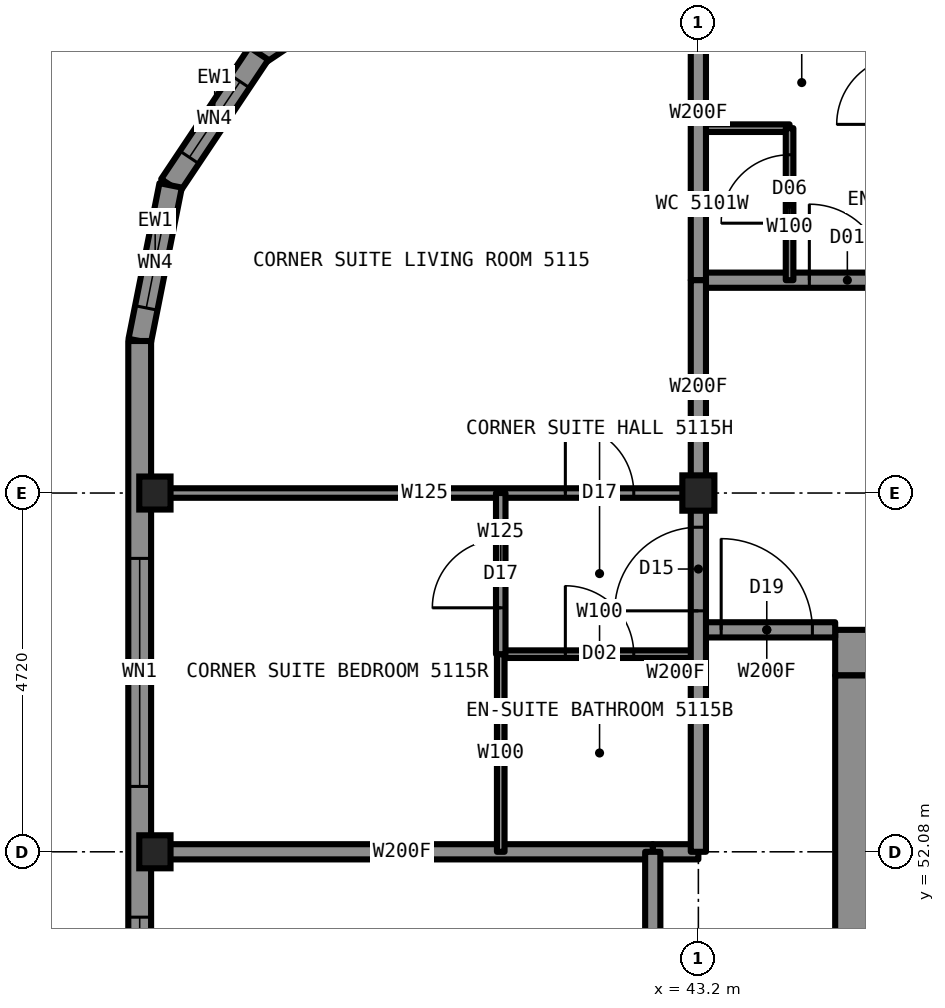
"""IFC4 building model, lengths in metres.
Left out: names, types, materials, properties, quantities, classifications, styles, units other than length and angle.
Written with IfcOpenShell. Run it as: python <this file> out.ifc"""

import sys

from ifc_helpers import new_model, si_unit, direction, frame, frame_2d, origin, origin_2d, place, context, subcontext, project, spatial, rectangle, i_section, extrude, element, fill, save


model = new_model("IFC4")
c1 = context("Model", 3, precision=1e-05, world=origin(), true_north=direction((0.0, 1.0)))
c2 = subcontext(c1, "Body", "Model", "MODEL_VIEW")
j1 = project(units=[si_unit("LENGTHUNIT", "METRE"), si_unit("PLANEANGLEUNIT", "RADIAN")], contexts=[c1])
p1 = place(None, origin())
s1 = spatial("IfcSite", under=j1, at=p1, CompositionType="ELEMENT")
p2 = place(p1, origin())
s2 = spatial("IfcBuilding", under=s1, at=p2, CompositionType="ELEMENT")
p3 = place(p2, frame((0.0, 0.0, 182.8)))
s3 = spatial("IfcBuildingStorey", under=s2, at=p3, CompositionType="ELEMENT", Elevation=182.8)
for number, where, z_axis, x_axis in (
    (1, (36.05, 52.08, 0.0), (0.0, 0.0, 1.0), (1.0, 0.0, 0.0)),
    (2, (36.05, 56.8, 0.0), (0.0, 0.0, 1.0), (1.0, 0.0, 0.0)),
):
    element("IfcColumn", number, at=place(p3, frame(where, z_axis=z_axis, x_axis=x_axis)), inside=s3, PredefinedType="COLUMN", context=c2, shape_type="SweptSolid", body=[
        extrude(i_section(OverallWidth=0.411, OverallDepth=0.434, WebThickness=0.036, FlangeThickness=0.057, at=origin_2d()), origin(), (0.0, 0.0, 1.0), 3.5),
    ])
p4 = place(p3, frame((43.2, 56.8, 0.0), z_axis=(0.0, 0.0, 1.0), x_axis=(1.0, 0.0, 0.0)))
e3 = element("IfcColumn", 3, at=p4, inside=s3, PredefinedType="COLUMN", context=c2, shape_type="SweptSolid", body=[
    extrude(i_section(OverallWidth=0.422, OverallDepth=0.465, WebThickness=0.045, FlangeThickness=0.073, at=origin_2d()), origin(), (0.0, 0.0, 1.0), 3.5),
])
p5 = place(p3, frame((45.0, 54.7, 0.0), z_axis=(0.0, 0.0, 1.0), x_axis=(1.0, 0.0, 0.0)))
e4 = element("IfcWall", 4, at=p5, inside=s3, PredefinedType="SHEAR", context=c2, shape_type="SweptSolid", body=[
    extrude(rectangle(XDim=20.0, YDim=0.6, at=frame_2d((10.0, 0.0))), origin(), (0.0, 0.0, 1.0), 3.5),
])
p6 = place(p3, frame((45.3, 35.6, 0.0), z_axis=(0.0, 0.0, 1.0), x_axis=(0.0, 1.0, 0.0)))
e5 = element("IfcWall", 5, at=p6, inside=s3, PredefinedType="SHEAR", context=c2, shape_type="SweptSolid", body=[
    extrude(rectangle(XDim=18.8, YDim=0.6, at=frame_2d((9.4, 0.0))), origin(), (0.0, 0.0, 1.0), 3.5),
])
p7 = place(p6, frame((13.4, 0.0, 0.0)))
e6 = element("IfcOpeningElement", 6, at=p7, cuts=e5, PredefinedType="OPENING", context=c2, shape_type="SweptSolid", body=[
    extrude(rectangle(XDim=1.8, YDim=2.2, at=frame_2d((0.9, 1.1))), frame((0.0, 0.31, 0.0), z_axis=(0.0, -1.0, 0.0), x_axis=(1.0, 0.0, 0.0)), (0.0, 0.0, 1.0), 0.62),
])
p8 = place(p6, frame((3.6, 0.0, 0.0)))
e7 = element("IfcOpeningElement", 7, at=p8, cuts=e5, PredefinedType="OPENING", context=c2, shape_type="SweptSolid", body=[
    extrude(rectangle(XDim=1.8, YDim=2.2, at=frame_2d((0.9, 1.1))), frame((0.0, 0.31, 0.0), z_axis=(0.0, -1.0, 0.0), x_axis=(1.0, 0.0, 0.0)), (0.0, 0.0, 1.0), 0.62),
])
p9 = place(p6, frame((6.4, 0.0, 0.0)))
e8 = element("IfcOpeningElement", 8, at=p9, cuts=e5, PredefinedType="OPENING", context=c2, shape_type="SweptSolid", body=[
    extrude(rectangle(XDim=1.2, YDim=2.2, at=frame_2d((0.6, 1.1))), frame((0.0, 0.31, 0.0), z_axis=(0.0, -1.0, 0.0), x_axis=(1.0, 0.0, 0.0)), (0.0, 0.0, 1.0), 0.62),
])
p10 = place(p3, frame((43.2, 55.0, 0.0), z_axis=(0.0, 0.0, 1.0), x_axis=(1.0, 0.0, 0.0)))
e9 = element("IfcWall", 9, at=p10, inside=s3, PredefinedType="PARTITIONING", context=c2, shape_type="SweptSolid", body=[
    extrude(rectangle(XDim=1.8, YDim=0.2, at=frame_2d((0.9, 0.0))), origin(), (0.0, 0.0, 1.0), 3.33),
])
p11 = place(p10, frame((0.3, 0.0, 0.0)))
e10 = element("IfcOpeningElement", 10, at=p11, cuts=e9, PredefinedType="OPENING", context=c2, shape_type="SweptSolid", body=[
    extrude(rectangle(XDim=1.2, YDim=2.2, at=frame_2d((0.6, 1.1))), frame((0.0, 0.11, 0.0), z_axis=(0.0, -1.0, 0.0), x_axis=(1.0, 0.0, 0.0)), (0.0, 0.0, 1.0), 0.22),
])
p12 = place(p3, frame((36.0, 56.8, 0.0), z_axis=(0.0, 0.0, 1.0), x_axis=(1.0, 0.0, 0.0)))
e11 = element("IfcWall", 11, at=p12, inside=s3, PredefinedType="PARTITIONING", context=c2, shape_type="SweptSolid", body=[
    extrude(rectangle(XDim=7.2, YDim=0.125, at=frame_2d((3.6, 0.0))), origin(), (0.0, 0.0, 1.0), 2.573),
])
p13 = place(p12, frame((5.45, 0.0, 0.0)))
e12 = element("IfcOpeningElement", 12, at=p13, cuts=e11, PredefinedType="OPENING", context=c2, shape_type="SweptSolid", body=[
    extrude(rectangle(XDim=0.9, YDim=2.2, at=frame_2d((0.45, 1.1))), frame((0.0, 0.073, 0.0), z_axis=(0.0, -1.0, 0.0), x_axis=(1.0, 0.0, 0.0)), (0.0, 0.0, 1.0), 0.145),
])
p14 = place(p3, frame((43.2, 59.6, 0.0), z_axis=(0.0, 0.0, 1.0), x_axis=(1.0, 0.0, 0.0)))
e13 = element("IfcWall", 13, at=p14, inside=s3, PredefinedType="PARTITIONING", context=c2, shape_type="SweptSolid", body=[
    extrude(rectangle(XDim=23.6, YDim=0.2, at=frame_2d((11.8, 0.0))), origin(), (0.0, 0.0, 1.0), 3.33),
])
p15 = place(p14, frame((1.46, 0.0, 0.0)))
e14 = element("IfcOpeningElement", 14, at=p15, cuts=e13, PredefinedType="OPENING", context=c2, shape_type="SweptSolid", body=[
    extrude(rectangle(XDim=1.0, YDim=2.2, at=frame_2d((0.5, 1.1))), frame((0.0, 0.11, 0.0), z_axis=(0.0, -1.0, 0.0), x_axis=(1.0, 0.0, 0.0)), (0.0, 0.0, 1.0), 0.22),
])
p16 = place(p14, frame((7.27, 0.0, 0.0)))
e15 = element("IfcOpeningElement", 15, at=p16, cuts=e13, PredefinedType="OPENING", context=c2, shape_type="SweptSolid", body=[
    extrude(rectangle(XDim=1.0, YDim=2.2, at=frame_2d((0.5, 1.1))), frame((0.0, 0.11, 0.0), z_axis=(0.0, -1.0, 0.0), x_axis=(1.0, 0.0, 0.0)), (0.0, 0.0, 1.0), 0.22),
])
p17 = place(p14, frame((9.84, 0.0, 0.0)))
e16 = element("IfcOpeningElement", 16, at=p17, cuts=e13, PredefinedType="OPENING", context=c2, shape_type="SweptSolid", body=[
    extrude(rectangle(XDim=1.0, YDim=2.2, at=frame_2d((0.5, 1.1))), frame((0.0, 0.11, 0.0), z_axis=(0.0, -1.0, 0.0), x_axis=(1.0, 0.0, 0.0)), (0.0, 0.0, 1.0), 0.22),
])
p18 = place(p14, frame((16.71, 0.0, 0.0)))
e17 = element("IfcOpeningElement", 17, at=p18, cuts=e13, PredefinedType="OPENING", context=c2, shape_type="SweptSolid", body=[
    extrude(rectangle(XDim=1.0, YDim=2.2, at=frame_2d((0.5, 1.1))), frame((0.0, 0.11, 0.0), z_axis=(0.0, -1.0, 0.0), x_axis=(1.0, 0.0, 0.0)), (0.0, 0.0, 1.0), 0.22),
])
p19 = place(p14, frame((20.34, 0.0, 0.0)))
e18 = element("IfcOpeningElement", 18, at=p19, cuts=e13, PredefinedType="OPENING", context=c2, shape_type="SweptSolid", body=[
    extrude(rectangle(XDim=1.0, YDim=2.2, at=frame_2d((0.5, 1.1))), frame((0.0, 0.11, 0.0), z_axis=(0.0, -1.0, 0.0), x_axis=(1.0, 0.0, 0.0)), (0.0, 0.0, 1.0), 0.22),
])
p20 = place(p3, frame((43.2, 61.6, 0.0), z_axis=(0.0, 0.0, 1.0), x_axis=(1.0, 0.0, 0.0)))
e19 = element("IfcWall", 19, at=p20, inside=s3, PredefinedType="PARTITIONING", context=c2, shape_type="SweptSolid", body=[
    extrude(rectangle(XDim=1.2, YDim=0.1, at=frame_2d((0.6, 0.0))), origin(), (0.0, 0.0, 1.0), 3.33),
])
p21 = place(p3, frame((42.6, 52.08, 0.0), z_axis=(0.0, 0.0, 1.0), x_axis=(1.0, 0.0, 0.0)))
e20 = element("IfcWall", 20, at=p21, inside=s3, PredefinedType="PARTITIONING", context=c2, shape_type="SweptSolid", body=[
    extrude(rectangle(XDim=0.6, YDim=0.2, at=frame_2d((0.3, 0.0))), origin(), (0.0, 0.0, 1.0), 2.573),
])
p22 = place(p3, frame((36.0, 52.08, 0.0), z_axis=(0.0, 0.0, 1.0), x_axis=(1.0, 0.0, 0.0)))
e21 = element("IfcWall", 21, at=p22, inside=s3, PredefinedType="PARTITIONING", context=c2, shape_type="SweptSolid", body=[
    extrude(rectangle(XDim=6.6, YDim=0.2, at=frame_2d((3.3, 0.0))), origin(), (0.0, 0.0, 1.0), 2.573),
])
p23 = place(p3, frame((40.6, 54.68, 0.0), z_axis=(0.0, 0.0, 1.0), x_axis=(1.0, 0.0, 0.0)))
e22 = element("IfcWall", 22, at=p23, inside=s3, PredefinedType="PARTITIONING", context=c2, shape_type="SweptSolid", body=[
    extrude(rectangle(XDim=2.6, YDim=0.1, at=frame_2d((1.3, 0.0))), origin(), (0.0, 0.0, 1.0), 3.33),
])
p24 = place(p23, frame((0.85, 0.0, 0.0)))
e23 = element("IfcOpeningElement", 23, at=p24, cuts=e22, PredefinedType="OPENING", context=c2, shape_type="SweptSolid", body=[
    extrude(rectangle(XDim=0.9, YDim=2.1, at=frame_2d((0.45, 1.05))), frame((0.0, 0.06, 0.0), z_axis=(0.0, -1.0, 0.0), x_axis=(1.0, 0.0, 0.0)), (0.0, 0.0, 1.0), 0.12),
])
p25 = place(p3, frame((44.4, 59.6, 0.0), z_axis=(0.0, 0.0, 1.0), x_axis=(0.0, 1.0, 0.0)))
e24 = element("IfcWall", 24, at=p25, inside=s3, PredefinedType="PARTITIONING", context=c2, shape_type="SweptSolid", body=[
    extrude(rectangle(XDim=2.0, YDim=0.1, at=frame_2d((1.0, 0.0))), origin(), (0.0, 0.0, 1.0), 3.33),
])
p26 = place(p25, frame((0.75, 0.0, 0.0)))
e25 = element("IfcOpeningElement", 25, at=p26, cuts=e24, PredefinedType="OPENING", context=c2, shape_type="SweptSolid", body=[
    extrude(rectangle(XDim=0.9, YDim=2.1, at=frame_2d((0.45, 1.05))), frame((0.0, 0.06, 0.0), z_axis=(0.0, -1.0, 0.0), x_axis=(1.0, 0.0, 0.0)), (0.0, 0.0, 1.0), 0.12),
])
p27 = place(p3, frame((43.2, 52.08, 0.0), z_axis=(0.0, 0.0, 1.0), x_axis=(0.0, 1.0, 0.0)))
e26 = element("IfcWall", 26, at=p27, inside=s3, PredefinedType="PARTITIONING", context=c2, shape_type="SweptSolid", body=[
    extrude(rectangle(XDim=4.7, YDim=0.2, at=frame_2d((2.35, 0.0))), origin(), (0.0, 0.0, 1.0), 3.33),
])
p28 = place(p27, frame((3.17, 0.0, 0.0)))
e27 = element("IfcOpeningElement", 27, at=p28, cuts=e26, PredefinedType="OPENING", context=c2, shape_type="SweptSolid", body=[
    extrude(rectangle(XDim=1.1, YDim=2.2, at=frame_2d((0.55, 1.1))), frame((0.0, 0.11, 0.0), z_axis=(0.0, -1.0, 0.0), x_axis=(1.0, 0.0, 0.0)), (0.0, 0.0, 1.0), 0.22),
])
p29 = place(p3, frame((43.2, 59.6, 0.0), z_axis=(0.0, 0.0, 1.0), x_axis=(0.0, 1.0, 0.0)))
e28 = element("IfcWall", 28, at=p29, inside=s3, PredefinedType="PARTITIONING", context=c2, shape_type="SweptSolid", body=[
    extrude(rectangle(XDim=4.4, YDim=0.2, at=frame_2d((2.2, 0.0))), origin(), (0.0, 0.0, 1.0), 2.573),
])
p30 = place(p3, frame((42.6, 37.92, 0.0), z_axis=(0.0, 0.0, 1.0), x_axis=(0.0, 1.0, 0.0)))
e29 = element("IfcWall", 29, at=p30, inside=s3, PredefinedType="PARTITIONING", context=c2, shape_type="SweptSolid", body=[
    extrude(rectangle(XDim=14.16, YDim=0.2, at=frame_2d((7.08, 0.0))), origin(), (0.0, 0.0, 1.0), 3.33),
])
p31 = place(p30, frame((3.0, 0.0, 0.0)))
e30 = element("IfcOpeningElement", 30, at=p31, cuts=e29, PredefinedType="OPENING", context=c2, shape_type="SweptSolid", body=[
    extrude(rectangle(XDim=1.0, YDim=2.2, at=frame_2d((0.5, 1.1))), frame((0.0, 0.11, 0.0), z_axis=(0.0, -1.0, 0.0), x_axis=(1.0, 0.0, 0.0)), (0.0, 0.0, 1.0), 0.22),
])
p32 = place(p30, frame((11.99, 0.0, 0.0)))
e31 = element("IfcOpeningElement", 31, at=p32, cuts=e29, PredefinedType="OPENING", context=c2, shape_type="SweptSolid", body=[
    extrude(rectangle(XDim=1.0, YDim=2.2, at=frame_2d((0.5, 1.1))), frame((0.0, 0.11, 0.0), z_axis=(0.0, -1.0, 0.0), x_axis=(1.0, 0.0, 0.0)), (0.0, 0.0, 1.0), 0.22),
])
p33 = place(p3, frame((40.6, 52.08, 0.0), z_axis=(0.0, 0.0, 1.0), x_axis=(0.0, 1.0, 0.0)))
e32 = element("IfcWall", 32, at=p33, inside=s3, PredefinedType="PARTITIONING", context=c2, shape_type="SweptSolid", body=[
    extrude(rectangle(XDim=2.6, YDim=0.1, at=frame_2d((1.3, 0.0))), origin(), (0.0, 0.0, 1.0), 3.33),
])
p34 = place(p3, frame((40.6, 54.68, 0.0), z_axis=(0.0, 0.0, 1.0), x_axis=(0.0, 1.0, 0.0)))
e33 = element("IfcWall", 33, at=p34, inside=s3, PredefinedType="PARTITIONING", context=c2, shape_type="SweptSolid", body=[
    extrude(rectangle(XDim=2.12, YDim=0.125, at=frame_2d((1.06, 0.0))), origin(), (0.0, 0.0, 1.0), 3.33),
])
p35 = place(p34, frame((0.61, 0.0, 0.0)))
e34 = element("IfcOpeningElement", 34, at=p35, cuts=e33, PredefinedType="OPENING", context=c2, shape_type="SweptSolid", body=[
    extrude(rectangle(XDim=0.9, YDim=2.2, at=frame_2d((0.45, 1.1))), frame((0.0, 0.073, 0.0), z_axis=(0.0, -1.0, 0.0), x_axis=(1.0, 0.0, 0.0)), (0.0, 0.0, 1.0), 0.145),
])
p36 = place(p3, frame((39.153, 63.743, 0.0), z_axis=(0.0, 0.0, 1.0), x_axis=(-0.831474039234, -0.555563607591, 0.0)))
e35 = element("IfcWall", 35, at=p36, inside=s3, PredefinedType="SOLIDWALL", context=c2, shape_type="SweptSolid", body=[
    extrude(rectangle(XDim=2.087, YDim=0.3, at=frame_2d((1.044, 0.0))), origin(), (0.0, 0.0, 1.0), 3.33),
])
p37 = place(p36, frame((0.444, 0.0, 0.3)))
e36 = element("IfcOpeningElement", 36, at=p37, cuts=e35, PredefinedType="OPENING", context=c2, shape_type="SweptSolid", body=[
    extrude(rectangle(XDim=1.2, YDim=2.0, at=frame_2d((0.6, 1.0))), frame((0.0, 0.16, 0.0), z_axis=(0.0, -1.0, 0.0), x_axis=(1.0, 0.0, 0.0)), (0.0, 0.0, 1.0), 0.32),
])
p38 = place(p3, frame((37.417, 62.583, 0.0), z_axis=(0.0, 0.0, 1.0), x_axis=(-0.555563607591, -0.831474039234, 0.0)))
e37 = element("IfcWall", 37, at=p38, inside=s3, PredefinedType="SOLIDWALL", context=c2, shape_type="SweptSolid", body=[
    extrude(rectangle(XDim=2.087, YDim=0.3, at=frame_2d((1.044, 0.0))), origin(), (0.0, 0.0, 1.0), 3.33),
])
p39 = place(p38, frame((0.444, 0.0, 0.3)))
e38 = element("IfcOpeningElement", 38, at=p39, cuts=e37, PredefinedType="OPENING", context=c2, shape_type="SweptSolid", body=[
    extrude(rectangle(XDim=1.2, YDim=2.0, at=frame_2d((0.6, 1.0))), frame((0.0, 0.16, 0.0), z_axis=(0.0, -1.0, 0.0), x_axis=(1.0, 0.0, 0.0)), (0.0, 0.0, 1.0), 0.32),
])
p40 = place(p3, frame((36.257, 60.847, 0.0), z_axis=(0.0, 0.0, 1.0), x_axis=(-0.195081421501, -0.980787050784, 0.0)))
e39 = element("IfcWall", 39, at=p40, inside=s3, PredefinedType="SOLIDWALL", context=c2, shape_type="SweptSolid", body=[
    extrude(rectangle(XDim=2.087, YDim=0.3, at=frame_2d((1.044, 0.0))), origin(), (0.0, 0.0, 1.0), 3.33),
])
p41 = place(p40, frame((0.444, 0.0, 0.3)))
e40 = element("IfcOpeningElement", 40, at=p41, cuts=e39, PredefinedType="OPENING", context=c2, shape_type="SweptSolid", body=[
    extrude(rectangle(XDim=1.2, YDim=2.0, at=frame_2d((0.6, 1.0))), frame((0.0, 0.16, 0.0), z_axis=(0.0, -1.0, 0.0), x_axis=(1.0, 0.0, 0.0)), (0.0, 0.0, 1.0), 0.32),
])
p42 = place(p3, frame((35.85, 58.8, 0.0), z_axis=(0.0, 0.0, 1.0), x_axis=(0.0, -1.0, 0.0)))
e41 = element("IfcWall", 41, at=p42, inside=s3, PredefinedType="SOLIDWALL", context=c2, shape_type="SweptSolid", body=[
    extrude(rectangle(XDim=27.6, YDim=0.3, at=frame_2d((13.8, 0.0))), origin(), (0.0, 0.0, 1.0), 2.83),
])
p43 = place(p42, frame((2.86, 0.0, 0.3)))
e42 = element("IfcOpeningElement", 42, at=p43, cuts=e41, PredefinedType="OPENING", context=c2, shape_type="SweptSolid", body=[
    extrude(rectangle(XDim=3.0, YDim=2.0, at=frame_2d((1.5, 1.0))), frame((0.0, 0.16, 0.0), z_axis=(0.0, -1.0, 0.0), x_axis=(1.0, 0.0, 0.0)), (0.0, 0.0, 1.0), 0.32),
])
p44 = place(p42, frame((9.88, 0.0, 0.3)))
e43 = element("IfcOpeningElement", 43, at=p44, cuts=e41, PredefinedType="OPENING", context=c2, shape_type="SweptSolid", body=[
    extrude(rectangle(XDim=0.7, YDim=1.1, at=frame_2d((0.35, 0.55))), frame((0.0, 0.16, 0.0), z_axis=(0.0, -1.0, 0.0), x_axis=(1.0, 0.0, 0.0)), (0.0, 0.0, 1.0), 0.32),
])
p45 = place(p42, frame((12.3, 0.0, 0.3)))
e44 = element("IfcOpeningElement", 44, at=p45, cuts=e41, PredefinedType="OPENING", context=c2, shape_type="SweptSolid", body=[
    extrude(rectangle(XDim=3.0, YDim=2.0, at=frame_2d((1.5, 1.0))), frame((0.0, 0.16, 0.0), z_axis=(0.0, -1.0, 0.0), x_axis=(1.0, 0.0, 0.0)), (0.0, 0.0, 1.0), 0.32),
])
p46 = place(p42, frame((17.02, 0.0, 0.3)))
e45 = element("IfcOpeningElement", 45, at=p46, cuts=e41, PredefinedType="OPENING", context=c2, shape_type="SweptSolid", body=[
    extrude(rectangle(XDim=0.7, YDim=1.1, at=frame_2d((0.35, 0.55))), frame((0.0, 0.16, 0.0), z_axis=(0.0, -1.0, 0.0), x_axis=(1.0, 0.0, 0.0)), (0.0, 0.0, 1.0), 0.32),
])
p47 = place(p42, frame((21.74, 0.0, 0.3)))
e46 = element("IfcOpeningElement", 46, at=p47, cuts=e41, PredefinedType="OPENING", context=c2, shape_type="SweptSolid", body=[
    extrude(rectangle(XDim=3.0, YDim=2.0, at=frame_2d((1.5, 1.0))), frame((0.0, 0.16, 0.0), z_axis=(0.0, -1.0, 0.0), x_axis=(1.0, 0.0, 0.0)), (0.0, 0.0, 1.0), 0.32),
])
p48 = place(p3, frame((43.2, 56.78, 0.0), z_axis=(0.0, 0.0, 1.0), x_axis=(0.0, 1.0, 0.0)))
e47 = element("IfcWall", 47, at=p48, inside=s3, PredefinedType="PARTITIONING", context=c2, shape_type="SweptSolid", body=[
    extrude(rectangle(XDim=2.82, YDim=0.2, at=frame_2d((1.41, 0.0))), origin(), (0.0, 0.0, 1.0), 2.573),
])
p49 = place(p11, origin())
e48 = element("IfcDoor", 48, at=p49, inside=s3, OperationType="SINGLE_SWING_LEFT", PredefinedType="DOOR", context=c2, shape_type="SweptSolid", body=[
    extrude(rectangle(XDim=1.2, YDim=2.2, at=frame_2d((0.6, 1.1))), frame((0.0, 0.025, 0.0), z_axis=(0.0, -1.0, 0.0), x_axis=(1.0, 0.0, 0.0)), (0.0, 0.0, 1.0), 0.05),
])
fill(e10, e48)
p50 = place(p15, origin())
e49 = element("IfcDoor", 49, at=p50, inside=s3, OperationType="SINGLE_SWING_LEFT", PredefinedType="DOOR", context=c2, shape_type="SweptSolid", body=[
    extrude(rectangle(XDim=1.0, YDim=2.2, at=frame_2d((0.5, 1.1))), frame((0.0, 0.025, 0.0), z_axis=(0.0, -1.0, 0.0), x_axis=(1.0, 0.0, 0.0)), (0.0, 0.0, 1.0), 0.05),
])
fill(e14, e49)
p51 = place(p26, origin())
e50 = element("IfcDoor", 50, at=p51, inside=s3, OperationType="SINGLE_SWING_LEFT", PredefinedType="DOOR", context=c2, shape_type="SweptSolid", body=[
    extrude(rectangle(XDim=0.9, YDim=2.1, at=frame_2d((0.45, 1.05))), frame((0.0, 0.025, 0.0), z_axis=(0.0, -1.0, 0.0), x_axis=(1.0, 0.0, 0.0)), (0.0, 0.0, 1.0), 0.05),
])
fill(e25, e50)
p52 = place(p13, origin())
e51 = element("IfcDoor", 51, at=p52, inside=s3, OperationType="SINGLE_SWING_LEFT", PredefinedType="DOOR", context=c2, shape_type="SweptSolid", body=[
    extrude(rectangle(XDim=0.9, YDim=2.2, at=frame_2d((0.45, 1.1))), frame((0.0, 0.025, 0.0), z_axis=(0.0, -1.0, 0.0), x_axis=(1.0, 0.0, 0.0)), (0.0, 0.0, 1.0), 0.05),
])
fill(e12, e51)
p53 = place(p24, origin())
e52 = element("IfcDoor", 52, at=p53, inside=s3, OperationType="SINGLE_SWING_RIGHT", PredefinedType="DOOR", context=c2, shape_type="SweptSolid", body=[
    extrude(rectangle(XDim=0.9, YDim=2.1, at=frame_2d((0.45, 1.05))), frame((0.0, 0.025, 0.0), z_axis=(0.0, -1.0, 0.0), x_axis=(1.0, 0.0, 0.0)), (0.0, 0.0, 1.0), 0.05),
])
fill(e23, e52)
p54 = place(p28, origin())
e53 = element("IfcDoor", 53, at=p54, inside=s3, OperationType="SINGLE_SWING_LEFT", PredefinedType="DOOR", context=c2, shape_type="SweptSolid", body=[
    extrude(rectangle(XDim=1.1, YDim=2.2, at=frame_2d((0.55, 1.1))), frame((0.0, 0.025, 0.0), z_axis=(0.0, -1.0, 0.0), x_axis=(1.0, 0.0, 0.0)), (0.0, 0.0, 1.0), 0.05),
])
fill(e27, e53)
p55 = place(p35, origin())
e54 = element("IfcDoor", 54, at=p55, inside=s3, OperationType="SINGLE_SWING_LEFT", PredefinedType="DOOR", context=c2, shape_type="SweptSolid", body=[
    extrude(rectangle(XDim=0.9, YDim=2.2, at=frame_2d((0.45, 1.1))), frame((0.0, 0.025, 0.0), z_axis=(0.0, -1.0, 0.0), x_axis=(1.0, 0.0, 0.0)), (0.0, 0.0, 1.0), 0.05),
])
fill(e34, e54)
p56 = place(p39, origin())
e55 = element("IfcWindow", 55, at=p56, inside=s3, PartitioningType="SINGLE_PANEL", PredefinedType="WINDOW", context=c2, shape_type="SweptSolid", body=[
    extrude(rectangle(XDim=1.2, YDim=2.0, at=frame_2d((0.6, 1.0))), frame((0.0, 0.13, 0.0), z_axis=(0.0, -1.0, 0.0), x_axis=(1.0, 0.0, 0.0)), (0.0, 0.0, 1.0), 0.06),
])
fill(e38, e55)
p57 = place(p41, origin())
e56 = element("IfcWindow", 56, at=p57, inside=s3, PartitioningType="SINGLE_PANEL", PredefinedType="WINDOW", context=c2, shape_type="SweptSolid", body=[
    extrude(rectangle(XDim=1.2, YDim=2.0, at=frame_2d((0.6, 1.0))), frame((0.0, 0.13, 0.0), z_axis=(0.0, -1.0, 0.0), x_axis=(1.0, 0.0, 0.0)), (0.0, 0.0, 1.0), 0.06),
])
fill(e40, e56)
p58 = place(p43, origin())
e57 = element("IfcWindow", 57, at=p58, inside=s3, PartitioningType="SINGLE_PANEL", PredefinedType="WINDOW", context=c2, shape_type="SweptSolid", body=[
    extrude(rectangle(XDim=3.0, YDim=2.0, at=frame_2d((1.5, 1.0))), frame((0.0, 0.13, 0.0), z_axis=(0.0, -1.0, 0.0), x_axis=(1.0, 0.0, 0.0)), (0.0, 0.0, 1.0), 0.06),
])
fill(e42, e57)
save(model, sys.argv[1])
